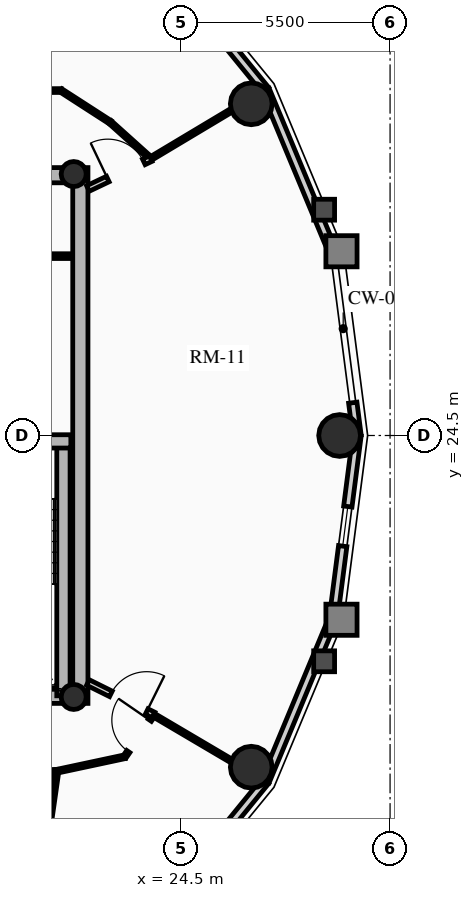
"""IFC4 building model, lengths in metres.
Left out: names, types, materials, properties, quantities, classifications, styles, units other than length and angle.
Written with IfcOpenShell. Run it as: python <this file> out.ifc"""

import sys

from ifc_helpers import new_model, si_unit, direction, frame, frame_2d, origin, origin_2d, place, context, subcontext, project, spatial, rectangle, circle, hollow_circle, extrude, source, transform, mapped, element, fill, save


model = new_model("IFC4")
c1 = context("Model", 3, precision=1e-05, world=origin(), true_north=direction((0.0, 1.0)))
c2 = subcontext(c1, "Body", "Model", "MODEL_VIEW")
j1 = project(units=[si_unit("LENGTHUNIT", "METRE"), si_unit("PLANEANGLEUNIT", "RADIAN")], contexts=[c1])
p1 = place(None, origin())
s1 = spatial("IfcSite", under=j1, at=p1, CompositionType="ELEMENT")
p2 = place(p1, origin())
s2 = spatial("IfcBuilding", under=s1, at=p2, CompositionType="ELEMENT")
p3 = place(p2, frame((0.0, 0.0, 202.48)))
s3 = spatial("IfcBuildingStorey", under=s2, at=p3, CompositionType="ELEMENT", Elevation=202.48)
p4 = place(p3, frame((21.85, 17.45, 0.0), z_axis=(0.0, 0.0, 1.0), x_axis=(0.0, 1.0, 0.0)))
e1 = element("IfcWall", 1, at=p4, inside=s3, PredefinedType="SHEAR", context=c2, shape_type="SweptSolid", body=[
    extrude(rectangle(XDim=14.1, YDim=0.4, at=frame_2d((7.05, 0.0))), origin(), (0.0, 0.0, 1.0), 2.91),
])
p5 = place(p3, frame((11.15, 17.65, 0.0), z_axis=(0.0, 0.0, 1.0), x_axis=(1.0, 0.0, 0.0)))
e2 = element("IfcWall", 2, at=p5, inside=s3, PredefinedType="SHEAR", context=c2, shape_type="SweptSolid", body=[
    extrude(rectangle(XDim=10.7, YDim=0.4, at=frame_2d((5.35, 0.0))), origin(), (0.0, 0.0, 1.0), 2.91),
])
m1 = source(origin(), c2, "Body", "SweptSolid", [
    extrude(rectangle(XDim=1.5, YDim=2.02, at=frame_2d((0.75, 1.01))), frame((0.0, 0.21, 0.0), z_axis=(0.0, -1.0, 0.0), x_axis=(1.0, 0.0, 0.0)), (0.0, 0.0, 1.0), 0.42),
])
p6 = place(p5, frame((5.45, 0.0, 0.0)))
e3 = element("IfcOpeningElement", 3, at=p6, cuts=e2, PredefinedType="OPENING", context=c2, shape_type="MappedRepresentation", body=[
    mapped(m1, transform((0.0, 0.0, 0.0), x_axis=(1.0, 0.0, 0.0), y_axis=(0.0, 1.0, 0.0), z_axis=(0.0, 0.0, 1.0), scale=1.0)),
])
p7 = place(p3, frame((11.15, 31.35, 0.0), z_axis=(0.0, 0.0, 1.0), x_axis=(1.0, 0.0, 0.0)))
e4 = element("IfcWall", 4, at=p7, inside=s3, PredefinedType="SHEAR", context=c2, shape_type="SweptSolid", body=[
    extrude(rectangle(XDim=10.7, YDim=0.4, at=frame_2d((5.35, 0.0))), origin(), (0.0, 0.0, 1.0), 2.91),
])
p8 = place(p7, frame((4.6, 0.0, 0.0)))
e5 = element("IfcOpeningElement", 5, at=p8, cuts=e4, PredefinedType="OPENING", context=c2, shape_type="MappedRepresentation", body=[
    mapped(m1, transform((0.0, 0.0, 0.0), x_axis=(1.0, 0.0, 0.0), y_axis=(0.0, 1.0, 0.0), z_axis=(0.0, 0.0, 1.0), scale=1.0)),
])
p9 = place(p3, frame((21.405, 17.65, 0.0), z_axis=(0.0, 0.0, 1.0), x_axis=(0.0, 1.0, 0.0)))
e6 = element("IfcWall", 6, at=p9, inside=s3, PredefinedType="SHEAR", context=c2, shape_type="SweptSolid", body=[
    extrude(rectangle(XDim=6.695, YDim=0.35, at=frame_2d((3.348, 0.0))), origin(), (0.0, 0.0, 1.0), 2.91),
])
p10 = place(p3, frame((18.315, 24.345, 0.0), z_axis=(0.0, 0.0, 1.0), x_axis=(1.0, 0.0, 0.0)))
e7 = element("IfcWall", 7, at=p10, inside=s3, PredefinedType="SHEAR", context=c2, shape_type="SweptSolid", body=[
    extrude(rectangle(XDim=3.285, YDim=0.35, at=frame_2d((1.643, 0.0))), origin(), (0.0, 0.0, 1.0), 2.91),
])
for number, where, z_axis, x_axis in (
    (8, (21.675, 17.62, 0.0), (0.0, 0.0, 1.0), (1.0, 0.0, 0.0)),
    (9, (21.675, 31.38, 0.0), (0.0, 0.0, 1.0), (1.0, 0.0, 0.0)),
):
    element("IfcColumn", number, at=place(p3, frame(where, z_axis=z_axis, x_axis=x_axis)), inside=s3, PredefinedType="COLUMN", context=c2, shape_type="SweptSolid", body=[
        extrude(hollow_circle(Radius=0.33, WallThickness=0.025, at=origin_2d()), origin(), (0.0, 0.0, 1.0), 2.91),
    ])
for number, where, z_axis, x_axis in (
    (10, (28.672, 24.5, 0.0), (0.0, 0.0, 1.0), (1.0, 0.0, 0.0)),
    (11, (26.347, 33.229, 0.0), (0.0, 0.0, 1.0), (1.0, 0.0, 0.0)),
    (12, (26.347, 15.771, 0.0), (0.0, 0.0, 1.0), (1.0, 0.0, 0.0)),
):
    element("IfcColumn", number, at=place(p3, frame(where, z_axis=z_axis, x_axis=x_axis)), inside=s3, PredefinedType="USERDEFINED", context=c2, shape_type="SweptSolid", body=[
        extrude(circle(Radius=0.55, at=origin_2d()), origin(), (0.0, 0.0, 1.0), 2.91),
    ])
p11 = place(p3, frame((29.018, 25.363, 0.0), z_axis=(0.0, 0.0, 1.0), x_axis=(0.128247365719, -0.991742211054, 0.0)))
e13 = element("IfcWall", 13, at=p11, inside=s3, PredefinedType="SOLIDWALL", context=c2, shape_type="SweptSolid", body=[
    extrude(rectangle(XDim=0.87, YDim=0.22, at=frame_2d((0.435, 0.0))), origin(), (0.0, 0.0, 1.0), 2.322),
])
p12 = place(p3, frame((26.718, 33.593, 0.0), z_axis=(0.0, 0.0, 1.0), x_axis=(0.384036305194, -0.923317993052, 0.0)))
e14 = element("IfcWall", 14, at=p12, inside=s3, PredefinedType="SOLIDWALL", context=c2, shape_type="SweptSolid", body=[
    extrude(rectangle(XDim=4.671, YDim=0.22, at=frame_2d((2.335, 0.0))), origin(), (0.0, 0.0, 1.0), 2.322),
])
p13 = place(p3, frame((23.924, 37.015, 0.0), z_axis=(0.0, 0.0, 1.0), x_axis=(0.632467166636, -0.774587169483, 0.0)))
e15 = element("IfcWall", 15, at=p13, inside=s3, PredefinedType="SOLIDWALL", context=c2, shape_type="SweptSolid", body=[
    extrude(rectangle(XDim=4.418, YDim=0.22, at=frame_2d((2.209, 0.0))), origin(), (0.0, 0.0, 1.0), 2.322),
])
m2 = source(origin(), c2, "Body", "SweptSolid", [
    extrude(rectangle(XDim=1.05, YDim=1.3, at=frame_2d((0.525, 0.65))), frame((0.0, 0.12, 0.0), z_axis=(0.0, -1.0, 0.0), x_axis=(1.0, 0.0, 0.0)), (0.0, 0.0, 1.0), 0.24),
])
p14 = place(p13, frame((1.684, 0.0, 0.65)))
e16 = element("IfcOpeningElement", 16, at=p14, cuts=e15, PredefinedType="OPENING", context=c2, shape_type="MappedRepresentation", body=[
    mapped(m2, transform((0.0, 0.0, 0.0), x_axis=(1.0, 0.0, 0.0), y_axis=(0.0, 1.0, 0.0), z_axis=(0.0, 0.0, 1.0), scale=1.0)),
])
p15 = place(p3, frame((26.718, 15.407, 0.0), z_axis=(0.0, 0.0, 1.0), x_axis=(-0.632467166636, -0.774587169483, 0.0)))
e17 = element("IfcWall", 17, at=p15, inside=s3, PredefinedType="SOLIDWALL", context=c2, shape_type="SweptSolid", body=[
    extrude(rectangle(XDim=4.418, YDim=0.22, at=frame_2d((2.209, 0.0))), origin(), (0.0, 0.0, 1.0), 2.322),
])
p16 = place(p15, frame((1.684, 0.0, 0.65)))
e18 = element("IfcOpeningElement", 18, at=p16, cuts=e17, PredefinedType="OPENING", context=c2, shape_type="MappedRepresentation", body=[
    mapped(m2, transform((0.0, 0.0, 0.0), x_axis=(1.0, 0.0, 0.0), y_axis=(0.0, 1.0, 0.0), z_axis=(0.0, 0.0, 1.0), scale=1.0)),
])
p17 = place(p3, frame((28.512, 19.719, 0.0), z_axis=(0.0, 0.0, 1.0), x_axis=(-0.384036305194, -0.923317993052, 0.0)))
e19 = element("IfcWall", 19, at=p17, inside=s3, PredefinedType="SOLIDWALL", context=c2, shape_type="SweptSolid", body=[
    extrude(rectangle(XDim=4.671, YDim=0.22, at=frame_2d((2.335, 0.0))), origin(), (0.0, 0.0, 1.0), 2.322),
])
p18 = place(p3, frame((29.13, 24.5, 0.0), z_axis=(0.0, 0.0, 1.0), x_axis=(-0.128241318541, -0.991742993027, 0.0)))
e20 = element("IfcWall", 20, at=p18, inside=s3, PredefinedType="SOLIDWALL", context=c2, shape_type="SweptSolid", body=[
    extrude(rectangle(XDim=4.82, YDim=0.22, at=frame_2d((2.41, 0.0))), origin(), (0.0, 0.0, 1.0), 2.322),
])
p19 = place(p18, frame((1.885, 0.0, 0.65)))
e21 = element("IfcOpeningElement", 21, at=p19, cuts=e20, PredefinedType="OPENING", context=c2, shape_type="MappedRepresentation", body=[
    mapped(m2, transform((0.0, 0.0, 0.0), x_axis=(1.0, 0.0, 0.0), y_axis=(0.0, 1.0, 0.0), z_axis=(0.0, 0.0, 1.0), scale=1.0)),
])
p20 = place(p3, frame((18.38, 29.22, 0.0), z_axis=(0.0, 0.0, 1.0), x_axis=(1.0, 0.0, 0.0)))
e22 = element("IfcWall", 22, at=p20, inside=s3, PredefinedType="PARTITIONING", context=c2, shape_type="SweptSolid", body=[
    extrude(rectangle(XDim=3.22, YDim=0.125, at=frame_2d((1.61, 0.0))), origin(), (0.0, 0.0, 1.0), 2.222),
])
p21 = place(p3, frame((23.701, 31.786, 0.0), z_axis=(0.0, 0.0, 1.0), x_axis=(-0.743742806382, 0.668465883913, 0.0)))
e23 = element("IfcWall", 23, at=p21, inside=s3, PredefinedType="MOVABLE", context=c2, shape_type="SweptSolid", body=[
    extrude(rectangle(XDim=1.434, YDim=0.1, at=frame_2d((0.717, 0.0))), origin(), (0.0, 0.0, 1.0), 2.322),
])
p22 = place(p3, frame((22.635, 32.744, 0.0), z_axis=(0.0, 0.0, 1.0), x_axis=(-0.840119270642, 0.542401706391, 0.0)))
e24 = element("IfcWall", 24, at=p22, inside=s3, PredefinedType="MOVABLE", context=c2, shape_type="SweptSolid", body=[
    extrude(rectangle(XDim=1.538, YDim=0.1, at=frame_2d((0.769, 0.0))), origin(), (0.0, 0.0, 1.0), 2.255),
])
p23 = place(p3, frame((21.344, 33.578, 0.0), z_axis=(0.0, 0.0, 1.0), x_axis=(-0.999984243152, -0.005613684, 0.0)))
e25 = element("IfcWall", 25, at=p23, inside=s3, PredefinedType="MOVABLE", context=c2, shape_type="SweptSolid", body=[
    extrude(rectangle(XDim=3.262, YDim=0.1, at=frame_2d((1.631, 0.0))), origin(), (0.0, 0.0, 1.0), 2.322),
])
m3 = source(origin(), c2, "Body", "SweptSolid", [
    extrude(rectangle(XDim=1.05, YDim=2.015, at=frame_2d((0.525, 1.007))), frame((0.0, 0.06, 0.0), z_axis=(0.0, -1.0, 0.0), x_axis=(1.0, 0.0, 0.0)), (0.0, 0.0, 1.0), 0.12),
])
p24 = place(p23, frame((1.599, 0.0, 0.0)))
e26 = element("IfcOpeningElement", 26, at=p24, cuts=e25, PredefinedType="OPENING", context=c2, shape_type="MappedRepresentation", body=[
    mapped(m3, transform((0.0, 0.0, 0.0), x_axis=(1.0, 0.0, 0.0), y_axis=(0.0, 1.0, 0.0), z_axis=(0.0, 0.0, 1.0), scale=1.0)),
])
p25 = place(p3, frame((14.845, 15.441, 0.0), z_axis=(0.0, 0.0, 1.0), x_axis=(0.99938794868, 0.034981824334, 0.0)))
e27 = element("IfcWall", 27, at=p25, inside=s3, PredefinedType="MOVABLE", context=c2, shape_type="SweptSolid", body=[
    extrude(rectangle(XDim=6.393, YDim=0.1, at=frame_2d((3.196, 0.0))), origin(), (0.0, 0.0, 1.0), 2.255),
])
p26 = place(p3, frame((21.234, 15.664, 0.0), z_axis=(0.0, 0.0, 1.0), x_axis=(0.977931581182, 0.208925399431, 0.0)))
e28 = element("IfcWall", 28, at=p26, inside=s3, PredefinedType="MOVABLE", context=c2, shape_type="SweptSolid", body=[
    extrude(rectangle(XDim=1.823, YDim=0.1, at=frame_2d((0.912, 0.0))), origin(), (0.0, 0.0, 1.0), 2.255),
])
p27 = place(p3, frame((23.017, 16.045, 0.0), z_axis=(0.0, 0.0, 1.0), x_axis=(0.566660656138, 0.823951273308, 0.0)))
e29 = element("IfcWall", 29, at=p27, inside=s3, PredefinedType="MOVABLE", context=c2, shape_type="SweptSolid", body=[
    extrude(rectangle(XDim=1.336, YDim=0.1, at=frame_2d((0.668, 0.0))), origin(), (0.0, 0.0, 1.0), 2.322),
])
m4 = source(origin(), c2, "Body", "SweptSolid", [
    extrude(rectangle(XDim=1.0, YDim=2.015, at=frame_2d((0.5, 1.007))), frame((0.0, 0.06, 0.0), z_axis=(0.0, -1.0, 0.0), x_axis=(1.0, 0.0, 0.0)), (0.0, 0.0, 1.0), 0.12),
])
p28 = place(p27, frame((0.168, 0.0, 0.0)))
e30 = element("IfcOpeningElement", 30, at=p28, cuts=e29, PredefinedType="OPENING", context=c2, shape_type="MappedRepresentation", body=[
    mapped(m4, transform((0.0, 0.0, 0.0), x_axis=(1.0, 0.0, 0.0), y_axis=(0.0, 1.0, 0.0), z_axis=(0.0, 0.0, 1.0), scale=1.0)),
])
p29 = place(p3, frame((23.701, 31.786, 0.0), z_axis=(0.0, 0.0, 1.0), x_axis=(0.858059206709, 0.513550774298, 0.0)))
e31 = element("IfcWall", 31, at=p29, inside=s3, PredefinedType="MOVABLE", context=c2, shape_type="SweptSolid", body=[
    extrude(rectangle(XDim=3.497, YDim=0.1, at=frame_2d((1.748, 0.0))), origin(), (0.0, 0.0, 1.0), 2.322),
])
p30 = place(p3, frame((21.234, 15.664, 0.0), z_axis=(0.0, 0.0, 1.0), x_axis=(-0.141467563045, -0.989942891588, 0.0)))
e32 = element("IfcWall", 32, at=p30, inside=s3, PredefinedType="MOVABLE", context=c2, shape_type="SweptSolid", body=[
    extrude(rectangle(XDim=5.918, YDim=0.1, at=frame_2d((2.959, 0.0))), origin(), (0.0, 0.0, 1.0), 2.322),
])
p31 = place(p3, frame((23.774, 17.146, 0.0), z_axis=(0.0, 0.0, 1.0), x_axis=(0.861296601099, -0.508102514198, 0.0)))
e33 = element("IfcWall", 33, at=p31, inside=s3, PredefinedType="MOVABLE", context=c2, shape_type="SweptSolid", body=[
    extrude(rectangle(XDim=3.399, YDim=0.1, at=frame_2d((1.7, 0.0))), origin(), (0.0, 0.0, 1.0), 2.322),
])
p32 = place(p3, frame((22.05, 31.0, 0.0), z_axis=(0.0, 0.0, 1.0), x_axis=(0.903013459407, 0.429612257891, 0.0)))
e34 = element("IfcWall", 34, at=p32, inside=s3, PredefinedType="PARTITIONING", context=c2, shape_type="SweptSolid", body=[
    extrude(rectangle(XDim=1.829, YDim=0.16, at=frame_2d((0.914, 0.0))), origin(), (0.0, 0.0, 1.0), 2.255),
])
m5 = source(origin(), c2, "Body", "SweptSolid", [
    extrude(rectangle(XDim=1.05, YDim=2.015, at=frame_2d((0.525, 1.007))), frame((0.0, 0.09, 0.0), z_axis=(0.0, -1.0, 0.0), x_axis=(1.0, 0.0, 0.0)), (0.0, 0.0, 1.0), 0.18),
])
p33 = place(p32, frame((0.579, 0.0, 0.0)))
e35 = element("IfcOpeningElement", 35, at=p33, cuts=e34, PredefinedType="OPENING", context=c2, shape_type="MappedRepresentation", body=[
    mapped(m5, transform((0.0, 0.0, 0.0), x_axis=(1.0, 0.0, 0.0), y_axis=(0.0, 1.0, 0.0), z_axis=(0.0, 0.0, 1.0), scale=1.0)),
])
p34 = place(p3, frame((22.05, 18.0, 0.0), z_axis=(0.0, 0.0, 1.0), x_axis=(0.896045848613, -0.443961526692, 0.0)))
e36 = element("IfcWall", 36, at=p34, inside=s3, PredefinedType="PARTITIONING", context=c2, shape_type="SweptSolid", body=[
    extrude(rectangle(XDim=1.924, YDim=0.16, at=frame_2d((0.962, 0.0))), origin(), (0.0, 0.0, 1.0), 2.255),
])
p35 = place(p34, frame((0.674, 0.0, 0.0)))
e37 = element("IfcOpeningElement", 37, at=p35, cuts=e36, PredefinedType="OPENING", context=c2, shape_type="MappedRepresentation", body=[
    mapped(m5, transform((0.0, 0.0, 0.0), x_axis=(1.0, 0.0, 0.0), y_axis=(0.0, 1.0, 0.0), z_axis=(0.0, 0.0, 1.0), scale=1.0)),
])
m6 = source(origin(), c2, "Body", "SweptSolid", [
    extrude(rectangle(XDim=1.05, YDim=1.3, at=frame_2d((0.525, 0.65))), frame((0.0, 0.03, 0.0), z_axis=(0.0, -1.0, 0.0), x_axis=(1.0, 0.0, 0.0)), (0.0, 0.0, 1.0), 0.06),
])
p36 = place(p19, origin())
e38 = element("IfcWindow", 38, at=p36, inside=s3, PartitioningType="SINGLE_PANEL", PredefinedType="WINDOW", context=c2, shape_type="MappedRepresentation", body=[
    mapped(m6, transform((0.0, 0.0, 0.0), x_axis=(1.0, 0.0, 0.0), y_axis=(0.0, 1.0, 0.0), z_axis=(0.0, 0.0, 1.0), scale=1.0)),
])
fill(e21, e38)
m7 = source(origin(), c2, "Body", "SweptSolid", [
    extrude(rectangle(XDim=1.05, YDim=2.015, at=frame_2d((0.525, 1.007))), frame((0.0, 0.025, 0.0), z_axis=(0.0, -1.0, 0.0), x_axis=(1.0, 0.0, 0.0)), (0.0, 0.0, 1.0), 0.05),
])
p37 = place(p33, origin())
e39 = element("IfcDoor", 39, at=p37, inside=s3, OperationType="SINGLE_SWING_LEFT", PredefinedType="DOOR", context=c2, shape_type="MappedRepresentation", body=[
    mapped(m7, transform((0.0, 0.0, 0.0), x_axis=(1.0, 0.0, 0.0), y_axis=(0.0, 1.0, 0.0), z_axis=(0.0, 0.0, 1.0), scale=1.0)),
])
fill(e35, e39)
p38 = place(p35, origin())
e40 = element("IfcDoor", 40, at=p38, inside=s3, OperationType="SINGLE_SWING_RIGHT", PredefinedType="DOOR", context=c2, shape_type="MappedRepresentation", body=[
    mapped(m7, transform((0.0, 0.0, 0.0), x_axis=(1.0, 0.0, 0.0), y_axis=(0.0, 1.0, 0.0), z_axis=(0.0, 0.0, 1.0), scale=1.0)),
])
fill(e37, e40)
m8 = source(origin(), c2, "Body", "SweptSolid", [
    extrude(rectangle(XDim=1.0, YDim=2.015, at=frame_2d((0.5, 1.007))), frame((0.0, 0.025, 0.0), z_axis=(0.0, -1.0, 0.0), x_axis=(1.0, 0.0, 0.0)), (0.0, 0.0, 1.0), 0.05),
])
p39 = place(p28, origin())
e41 = element("IfcDoor", 41, at=p39, inside=s3, OperationType="SINGLE_SWING_RIGHT", PredefinedType="DOOR", context=c2, shape_type="MappedRepresentation", body=[
    mapped(m8, transform((0.0, 0.0, 0.0), x_axis=(1.0, 0.0, 0.0), y_axis=(0.0, 1.0, 0.0), z_axis=(0.0, 0.0, 1.0), scale=1.0)),
])
fill(e30, e41)
save(model, sys.argv[1])
